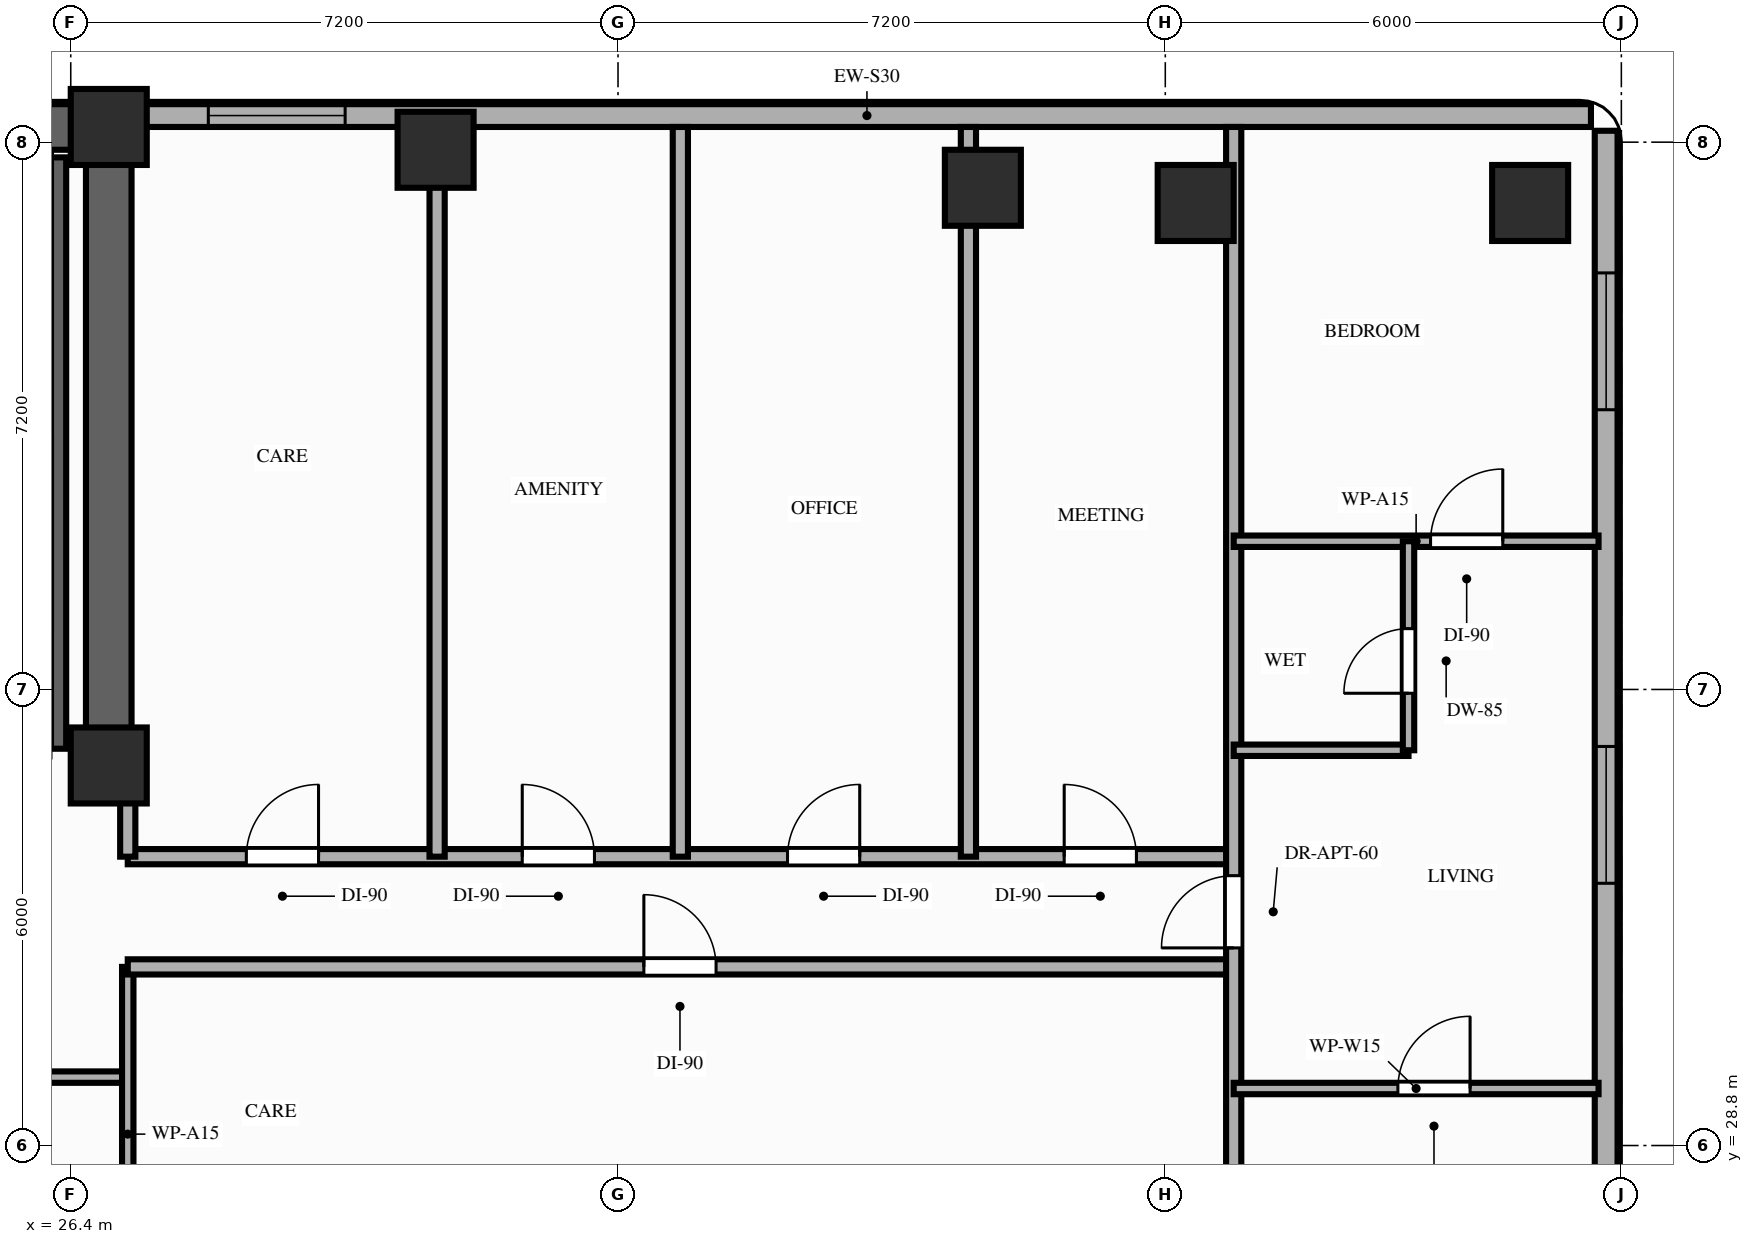
"""IFC4 building model, lengths in metres.
Left out: names, types, materials, properties, quantities, classifications, styles, units other than length and angle.
Written with IfcOpenShell. Run it as: python <this file> out.ifc"""

import sys

from ifc_helpers import new_model, si_unit, direction, frame, frame_2d, origin, origin_2d, place, context, subcontext, project, spatial, rectangle, extrude, element, fill, save


model = new_model("IFC4")
c1 = context("Model", 3, precision=1e-05, world=origin(), true_north=direction((0.0, 1.0)))
c2 = subcontext(c1, "Body", "Model", "MODEL_VIEW")
j1 = project(units=[si_unit("LENGTHUNIT", "METRE"), si_unit("PLANEANGLEUNIT", "RADIAN")], contexts=[c1])
p1 = place(None, origin())
s1 = spatial("IfcSite", under=j1, at=p1, CompositionType="ELEMENT")
p2 = place(p1, origin())
s2 = spatial("IfcBuilding", under=s1, at=p2, CompositionType="ELEMENT")
p3 = place(p2, frame((0.0, 0.0, 113.8)))
s3 = spatial("IfcBuildingStorey", under=s2, at=p3, CompositionType="ELEMENT", Elevation=113.8)
for number, where, z_axis, x_axis in (
    (1, (26.9, 33.8, 0.0), (0.0, 0.0, 1.0), (1.0, 0.0, 0.0)),
    (2, (26.9, 42.2, 0.0), (0.0, 0.0, 1.0), (1.0, 0.0, 0.0)),
    (3, (31.2, 41.9, 0.0), (0.0, 0.0, 1.0), (1.0, 0.0, 0.0)),
    (4, (38.4, 41.4, 0.0), (0.0, 0.0, 1.0), (1.0, 0.0, 0.0)),
    (5, (41.2, 41.2, 0.0), (0.0, 0.0, 1.0), (1.0, 0.0, 0.0)),
    (6, (45.6, 41.2, 0.0), (0.0, 0.0, 1.0), (1.0, 0.0, 0.0)),
):
    element("IfcColumn", number, at=place(p3, frame(where, z_axis=z_axis, x_axis=x_axis)), inside=s3, PredefinedType="COLUMN", context=c2, shape_type="SweptSolid", body=[
        extrude(rectangle(XDim=1.0, YDim=1.0, at=origin_2d()), origin(), (0.0, 0.0, 1.0), 3.2),
    ])
p4 = place(p3, frame((46.4, 42.35, 0.0), z_axis=(0.0, 0.0, 1.0), x_axis=(-1.0, 0.0, 0.0)))
e7 = element("IfcWall", 7, at=p4, inside=s3, PredefinedType="STANDARD", context=c2, shape_type="SweptSolid", body=[
    extrude(rectangle(XDim=19.05, YDim=0.3, at=frame_2d((9.525, 0.0))), origin(), (0.0, 0.0, 1.0), 2.4),
])
p5 = place(p4, frame((16.39, 0.0, 0.85)))
e8 = element("IfcOpeningElement", 8, at=p5, cuts=e7, PredefinedType="OPENING", context=c2, shape_type="SweptSolid", body=[
    extrude(rectangle(XDim=1.8, YDim=1.3, at=frame_2d((0.9, 0.65))), frame((0.0, 0.16, 0.0), z_axis=(0.0, -1.0, 0.0), x_axis=(1.0, 0.0, 0.0)), (0.0, 0.0, 1.0), 0.32),
])
p6 = place(p3, frame((46.6, 26.8, 0.0), z_axis=(0.0, 0.0, 1.0), x_axis=(0.0, 1.0, 0.0)))
e9 = element("IfcWall", 9, at=p6, inside=s3, PredefinedType="STANDARD", context=c2, shape_type="SweptSolid", body=[
    extrude(rectangle(XDim=15.35, YDim=0.3, at=frame_2d((7.675, 0.0))), origin(), (0.0, 0.0, 1.0), 3.02),
])
p7 = place(p6, frame((5.45, 0.0, 0.85)))
e10 = element("IfcOpeningElement", 10, at=p7, cuts=e9, PredefinedType="OPENING", context=c2, shape_type="SweptSolid", body=[
    extrude(rectangle(XDim=1.8, YDim=1.75, at=frame_2d((0.9, 0.875))), frame((0.0, 0.16, 0.0), z_axis=(0.0, -1.0, 0.0), x_axis=(1.0, 0.0, 0.0)), (0.0, 0.0, 1.0), 0.32),
])
p8 = place(p6, frame((11.68, 0.0, 0.85)))
e11 = element("IfcOpeningElement", 11, at=p8, cuts=e9, PredefinedType="OPENING", context=c2, shape_type="SweptSolid", body=[
    extrude(rectangle(XDim=1.8, YDim=1.75, at=frame_2d((0.9, 0.875))), frame((0.0, 0.16, 0.0), z_axis=(0.0, -1.0, 0.0), x_axis=(1.0, 0.0, 0.0)), (0.0, 0.0, 1.0), 0.32),
])
p9 = place(p3, frame((6.45, 42.2, 0.0), z_axis=(0.0, 0.0, 1.0), x_axis=(1.0, 0.0, 0.0)))
e12 = element("IfcWall", 12, at=p9, inside=s3, PredefinedType="SHEAR", context=c2, shape_type="SweptSolid", body=[
    extrude(rectangle(XDim=20.45, YDim=0.6, at=frame_2d((10.225, 0.0))), origin(), (0.0, 0.0, 1.0), 3.02),
])
p10 = place(p3, frame((26.9, 33.8, 0.0), z_axis=(0.0, 0.0, 1.0), x_axis=(0.0, 1.0, 0.0)))
e13 = element("IfcWall", 13, at=p10, inside=s3, PredefinedType="SHEAR", context=c2, shape_type="SweptSolid", body=[
    extrude(rectangle(XDim=7.95, YDim=0.6, at=frame_2d((3.975, 0.0))), origin(), (0.0, 0.0, 1.0), 3.02),
])
p11 = place(p3, frame((26.24, 34.02, 0.0), z_axis=(0.0, 0.0, 1.0), x_axis=(0.0, 1.0, 0.0)))
e14 = element("IfcWall", 14, at=p11, inside=s3, PredefinedType="SHEAR", context=c2, shape_type="SweptSolid", body=[
    extrude(rectangle(XDim=7.78, YDim=0.2, at=frame_2d((3.89, 0.0))), origin(), (0.0, 0.0, 1.0), 3.02),
])
p12 = place(p3, frame((20.45, 29.7, 0.0), z_axis=(0.0, 0.0, 1.0), x_axis=(1.0, 0.0, 0.0)))
e15 = element("IfcWall", 15, at=p12, inside=s3, PredefinedType="PARTITIONING", context=c2, shape_type="SweptSolid", body=[
    extrude(rectangle(XDim=6.7, YDim=0.15, at=frame_2d((3.35, 0.0))), origin(), (0.0, 0.0, 1.0), 3.02),
])
p13 = place(p12, frame((2.8, 0.0, 0.0)))
e16 = element("IfcOpeningElement", 16, at=p13, cuts=e15, PredefinedType="OPENING", context=c2, shape_type="SweptSolid", body=[
    extrude(rectangle(XDim=0.95, YDim=2.15, at=frame_2d((0.475, 1.075))), frame((0.0, 0.085, 0.0), z_axis=(0.0, -1.0, 0.0), x_axis=(1.0, 0.0, 0.0)), (0.0, 0.0, 1.0), 0.17),
])
p14 = place(p3, frame((27.15, 26.75, 0.0), z_axis=(0.0, 0.0, 1.0), x_axis=(0.0, 1.0, 0.0)))
e17 = element("IfcWall", 17, at=p14, inside=s3, PredefinedType="PARTITIONING", context=c2, shape_type="SweptSolid", body=[
    extrude(rectangle(XDim=4.4, YDim=0.15, at=frame_2d((2.2, 0.0))), origin(), (0.0, 0.0, 1.0), 2.4),
])
p15 = place(p3, frame((27.15, 31.15, 0.0), z_axis=(0.0, 0.0, 1.0), x_axis=(1.0, 0.0, 0.0)))
e18 = element("IfcWall", 18, at=p15, inside=s3, PredefinedType="PARTITIONING", context=c2, shape_type="SweptSolid", body=[
    extrude(rectangle(XDim=14.55, YDim=0.2, at=frame_2d((7.275, 0.0))), origin(), (0.0, 0.0, 1.0), 2.4),
])
p16 = place(p15, frame((6.79, 0.0, 0.0)))
e19 = element("IfcOpeningElement", 19, at=p16, cuts=e18, PredefinedType="OPENING", context=c2, shape_type="SweptSolid", body=[
    extrude(rectangle(XDim=0.95, YDim=2.15, at=frame_2d((0.475, 1.075))), frame((0.0, 0.11, 0.0), z_axis=(0.0, -1.0, 0.0), x_axis=(1.0, 0.0, 0.0)), (0.0, 0.0, 1.0), 0.22),
])
p17 = place(p3, frame((27.15, 32.6, 0.0), z_axis=(0.0, 0.0, 1.0), x_axis=(1.0, 0.0, 0.0)))
e20 = element("IfcWall", 20, at=p17, inside=s3, PredefinedType="PARTITIONING", context=c2, shape_type="SweptSolid", body=[
    extrude(rectangle(XDim=14.55, YDim=0.2, at=frame_2d((7.275, 0.0))), origin(), (0.0, 0.0, 1.0), 2.4),
])
p18 = place(p17, frame((1.56, 0.0, 0.0)))
e21 = element("IfcOpeningElement", 21, at=p18, cuts=e20, PredefinedType="OPENING", context=c2, shape_type="SweptSolid", body=[
    extrude(rectangle(XDim=0.95, YDim=2.15, at=frame_2d((0.475, 1.075))), frame((0.0, 0.11, 0.0), z_axis=(0.0, -1.0, 0.0), x_axis=(1.0, 0.0, 0.0)), (0.0, 0.0, 1.0), 0.22),
])
p19 = place(p17, frame((5.19, 0.0, 0.0)))
e22 = element("IfcOpeningElement", 22, at=p19, cuts=e20, PredefinedType="OPENING", context=c2, shape_type="SweptSolid", body=[
    extrude(rectangle(XDim=0.95, YDim=2.15, at=frame_2d((0.475, 1.075))), frame((0.0, 0.11, 0.0), z_axis=(0.0, -1.0, 0.0), x_axis=(1.0, 0.0, 0.0)), (0.0, 0.0, 1.0), 0.22),
])
p20 = place(p17, frame((8.68, 0.0, 0.0)))
e23 = element("IfcOpeningElement", 23, at=p20, cuts=e20, PredefinedType="OPENING", context=c2, shape_type="SweptSolid", body=[
    extrude(rectangle(XDim=0.95, YDim=2.15, at=frame_2d((0.475, 1.075))), frame((0.0, 0.11, 0.0), z_axis=(0.0, -1.0, 0.0), x_axis=(1.0, 0.0, 0.0)), (0.0, 0.0, 1.0), 0.22),
])
p21 = place(p17, frame((12.32, 0.0, 0.0)))
e24 = element("IfcOpeningElement", 24, at=p21, cuts=e20, PredefinedType="OPENING", context=c2, shape_type="SweptSolid", body=[
    extrude(rectangle(XDim=0.95, YDim=2.15, at=frame_2d((0.475, 1.075))), frame((0.0, 0.11, 0.0), z_axis=(0.0, -1.0, 0.0), x_axis=(1.0, 0.0, 0.0)), (0.0, 0.0, 1.0), 0.22),
])
p22 = place(p3, frame((27.15, 32.6, 0.0), z_axis=(0.0, 0.0, 1.0), x_axis=(0.0, 1.0, 0.0)))
e25 = element("IfcWall", 25, at=p22, inside=s3, PredefinedType="PARTITIONING", context=c2, shape_type="SweptSolid", body=[
    extrude(rectangle(XDim=1.08, YDim=0.2, at=frame_2d((0.54, 0.0))), origin(), (0.0, 0.0, 1.0), 2.4),
])
p23 = place(p3, frame((41.7, 26.75, 0.0), z_axis=(0.0, 0.0, 1.0), x_axis=(0.0, 1.0, 0.0)))
e26 = element("IfcWall", 26, at=p23, inside=s3, PredefinedType="PARTITIONING", context=c2, shape_type="SweptSolid", body=[
    extrude(rectangle(XDim=15.45, YDim=0.2, at=frame_2d((7.725, 0.0))), origin(), (0.0, 0.0, 1.0), 2.4),
])
p24 = place(p23, frame((4.65, 0.0, 0.0)))
e27 = element("IfcOpeningElement", 27, at=p24, cuts=e26, PredefinedType="OPENING", context=c2, shape_type="SweptSolid", body=[
    extrude(rectangle(XDim=0.95, YDim=2.15, at=frame_2d((0.475, 1.075))), frame((0.0, 0.11, 0.0), z_axis=(0.0, -1.0, 0.0), x_axis=(1.0, 0.0, 0.0)), (0.0, 0.0, 1.0), 0.22),
])
p25 = place(p3, frame((41.7, 29.55, 0.0), z_axis=(0.0, 0.0, 1.0), x_axis=(1.0, 0.0, 0.0)))
e28 = element("IfcWall", 28, at=p25, inside=s3, PredefinedType="PARTITIONING", context=c2, shape_type="SweptSolid", body=[
    extrude(rectangle(XDim=4.8, YDim=0.15, at=frame_2d((2.4, 0.0))), origin(), (0.0, 0.0, 1.0), 2.4),
])
p26 = place(p25, frame((2.16, 0.0, 0.0)))
e29 = element("IfcOpeningElement", 29, at=p26, cuts=e28, PredefinedType="OPENING", context=c2, shape_type="SweptSolid", body=[
    extrude(rectangle(XDim=0.95, YDim=2.15, at=frame_2d((0.475, 1.075))), frame((0.0, 0.085, 0.0), z_axis=(0.0, -1.0, 0.0), x_axis=(1.0, 0.0, 0.0)), (0.0, 0.0, 1.0), 0.17),
])
p27 = place(p3, frame((41.7, 36.75, 0.0), z_axis=(0.0, 0.0, 1.0), x_axis=(1.0, 0.0, 0.0)))
e30 = element("IfcWall", 30, at=p27, inside=s3, PredefinedType="PARTITIONING", context=c2, shape_type="SweptSolid", body=[
    extrude(rectangle(XDim=4.8, YDim=0.15, at=frame_2d((2.4, 0.0))), origin(), (0.0, 0.0, 1.0), 2.4),
])
p28 = place(p27, frame((2.59, 0.0, 0.0)))
e31 = element("IfcOpeningElement", 31, at=p28, cuts=e30, PredefinedType="OPENING", context=c2, shape_type="SweptSolid", body=[
    extrude(rectangle(XDim=0.95, YDim=2.15, at=frame_2d((0.475, 1.075))), frame((0.0, 0.085, 0.0), z_axis=(0.0, -1.0, 0.0), x_axis=(1.0, 0.0, 0.0)), (0.0, 0.0, 1.0), 0.17),
])
p29 = place(p3, frame((41.7, 34.0, 0.0), z_axis=(0.0, 0.0, 1.0), x_axis=(1.0, 0.0, 0.0)))
e32 = element("IfcWall", 32, at=p29, inside=s3, PredefinedType="PARTITIONING", context=c2, shape_type="SweptSolid", body=[
    extrude(rectangle(XDim=2.3, YDim=0.15, at=frame_2d((1.15, 0.0))), origin(), (0.0, 0.0, 1.0), 2.7),
])
p30 = place(p3, frame((44.0, 34.0, 0.0), z_axis=(0.0, 0.0, 1.0), x_axis=(0.0, 1.0, 0.0)))
e33 = element("IfcWall", 33, at=p30, inside=s3, PredefinedType="PARTITIONING", context=c2, shape_type="SweptSolid", body=[
    extrude(rectangle(XDim=2.75, YDim=0.15, at=frame_2d((1.375, 0.0))), origin(), (0.0, 0.0, 1.0), 2.61),
])
p31 = place(p30, frame((0.75, 0.0, 0.0)))
e34 = element("IfcOpeningElement", 34, at=p31, cuts=e33, PredefinedType="OPENING", context=c2, shape_type="SweptSolid", body=[
    extrude(rectangle(XDim=0.85, YDim=2.1, at=frame_2d((0.425, 1.05))), frame((0.0, 0.085, 0.0), z_axis=(0.0, -1.0, 0.0), x_axis=(1.0, 0.0, 0.0)), (0.0, 0.0, 1.0), 0.17),
])
for number, where, z_axis, x_axis in (
    (35, (31.22, 32.6, 0.0), (0.0, 0.0, 1.0), (0.0, 1.0, 0.0)),
    (36, (34.42, 32.6, 0.0), (0.0, 0.0, 1.0), (0.0, 1.0, 0.0)),
    (37, (38.21, 32.6, 0.0), (0.0, 0.0, 1.0), (0.0, 1.0, 0.0)),
):
    element("IfcWall", number, at=place(p3, frame(where, z_axis=z_axis, x_axis=x_axis)), inside=s3, PredefinedType="PARTITIONING", context=c2, shape_type="SweptSolid", body=[
        extrude(rectangle(XDim=9.6, YDim=0.2, at=frame_2d((4.8, 0.0))), origin(), (0.0, 0.0, 1.0), 2.4),
    ])
p32 = place(p7, origin())
e38 = element("IfcWindow", 38, at=p32, inside=s3, PartitioningType="SINGLE_PANEL", PredefinedType="WINDOW", context=c2, shape_type="SweptSolid", body=[
    extrude(rectangle(XDim=1.8, YDim=1.75, at=frame_2d((0.9, 0.875))), frame((0.0, 0.03, 0.0), z_axis=(0.0, -1.0, 0.0), x_axis=(1.0, 0.0, 0.0)), (0.0, 0.0, 1.0), 0.06),
])
fill(e10, e38)
p33 = place(p8, origin())
e39 = element("IfcWindow", 39, at=p33, inside=s3, PartitioningType="SINGLE_PANEL", PredefinedType="WINDOW", context=c2, shape_type="SweptSolid", body=[
    extrude(rectangle(XDim=1.8, YDim=1.75, at=frame_2d((0.9, 0.875))), frame((0.0, 0.03, 0.0), z_axis=(0.0, -1.0, 0.0), x_axis=(1.0, 0.0, 0.0)), (0.0, 0.0, 1.0), 0.06),
])
fill(e11, e39)
p34 = place(p5, origin())
e40 = element("IfcWindow", 40, at=p34, inside=s3, PartitioningType="SINGLE_PANEL", PredefinedType="WINDOW", context=c2, shape_type="SweptSolid", body=[
    extrude(rectangle(XDim=1.8, YDim=1.3, at=frame_2d((0.9, 0.65))), frame((0.0, 0.03, 0.0), z_axis=(0.0, -1.0, 0.0), x_axis=(1.0, 0.0, 0.0)), (0.0, 0.0, 1.0), 0.06),
])
fill(e8, e40)
p35 = place(p24, origin())
e41 = element("IfcDoor", 41, at=p35, inside=s3, OperationType="SINGLE_SWING_LEFT", PredefinedType="DOOR", context=c2, shape_type="SweptSolid", body=[
    extrude(rectangle(XDim=0.95, YDim=2.15, at=frame_2d((0.475, 1.075))), frame((0.0, 0.025, 0.0), z_axis=(0.0, -1.0, 0.0), x_axis=(1.0, 0.0, 0.0)), (0.0, 0.0, 1.0), 0.05),
])
fill(e27, e41)
p36 = place(p28, origin())
e42 = element("IfcDoor", 42, at=p36, inside=s3, OperationType="SINGLE_SWING_RIGHT", PredefinedType="DOOR", context=c2, shape_type="SweptSolid", body=[
    extrude(rectangle(XDim=0.95, YDim=2.15, at=frame_2d((0.475, 1.075))), frame((0.0, 0.025, 0.0), z_axis=(0.0, -1.0, 0.0), x_axis=(1.0, 0.0, 0.0)), (0.0, 0.0, 1.0), 0.05),
])
fill(e31, e42)
p37 = place(p31, origin())
e43 = element("IfcDoor", 43, at=p37, inside=s3, OperationType="SINGLE_SWING_LEFT", PredefinedType="DOOR", context=c2, shape_type="SweptSolid", body=[
    extrude(rectangle(XDim=0.85, YDim=2.1, at=frame_2d((0.425, 1.05))), frame((0.0, 0.025, 0.0), z_axis=(0.0, -1.0, 0.0), x_axis=(1.0, 0.0, 0.0)), (0.0, 0.0, 1.0), 0.05),
])
fill(e34, e43)
p38 = place(p26, origin())
e44 = element("IfcDoor", 44, at=p38, inside=s3, OperationType="SINGLE_SWING_RIGHT", PredefinedType="DOOR", context=c2, shape_type="SweptSolid", body=[
    extrude(rectangle(XDim=0.95, YDim=2.15, at=frame_2d((0.475, 1.075))), frame((0.0, 0.025, 0.0), z_axis=(0.0, -1.0, 0.0), x_axis=(1.0, 0.0, 0.0)), (0.0, 0.0, 1.0), 0.05),
])
fill(e29, e44)
p39 = place(p16, origin())
e45 = element("IfcDoor", 45, at=p39, inside=s3, OperationType="SINGLE_SWING_LEFT", PredefinedType="DOOR", context=c2, shape_type="SweptSolid", body=[
    extrude(rectangle(XDim=0.95, YDim=2.15, at=frame_2d((0.475, 1.075))), frame((0.0, 0.025, 0.0), z_axis=(0.0, -1.0, 0.0), x_axis=(1.0, 0.0, 0.0)), (0.0, 0.0, 1.0), 0.05),
])
fill(e19, e45)
p40 = place(p18, origin())
e46 = element("IfcDoor", 46, at=p40, inside=s3, OperationType="SINGLE_SWING_RIGHT", PredefinedType="DOOR", context=c2, shape_type="SweptSolid", body=[
    extrude(rectangle(XDim=0.95, YDim=2.15, at=frame_2d((0.475, 1.075))), frame((0.0, 0.025, 0.0), z_axis=(0.0, -1.0, 0.0), x_axis=(1.0, 0.0, 0.0)), (0.0, 0.0, 1.0), 0.05),
])
fill(e21, e46)
p41 = place(p19, origin())
e47 = element("IfcDoor", 47, at=p41, inside=s3, OperationType="SINGLE_SWING_LEFT", PredefinedType="DOOR", context=c2, shape_type="SweptSolid", body=[
    extrude(rectangle(XDim=0.95, YDim=2.15, at=frame_2d((0.475, 1.075))), frame((0.0, 0.025, 0.0), z_axis=(0.0, -1.0, 0.0), x_axis=(1.0, 0.0, 0.0)), (0.0, 0.0, 1.0), 0.05),
])
fill(e22, e47)
p42 = place(p20, origin())
e48 = element("IfcDoor", 48, at=p42, inside=s3, OperationType="SINGLE_SWING_RIGHT", PredefinedType="DOOR", context=c2, shape_type="SweptSolid", body=[
    extrude(rectangle(XDim=0.95, YDim=2.15, at=frame_2d((0.475, 1.075))), frame((0.0, 0.025, 0.0), z_axis=(0.0, -1.0, 0.0), x_axis=(1.0, 0.0, 0.0)), (0.0, 0.0, 1.0), 0.05),
])
fill(e23, e48)
p43 = place(p21, origin())
e49 = element("IfcDoor", 49, at=p43, inside=s3, OperationType="SINGLE_SWING_LEFT", PredefinedType="DOOR", context=c2, shape_type="SweptSolid", body=[
    extrude(rectangle(XDim=0.95, YDim=2.15, at=frame_2d((0.475, 1.075))), frame((0.0, 0.025, 0.0), z_axis=(0.0, -1.0, 0.0), x_axis=(1.0, 0.0, 0.0)), (0.0, 0.0, 1.0), 0.05),
])
fill(e24, e49)
save(model, sys.argv[1])
